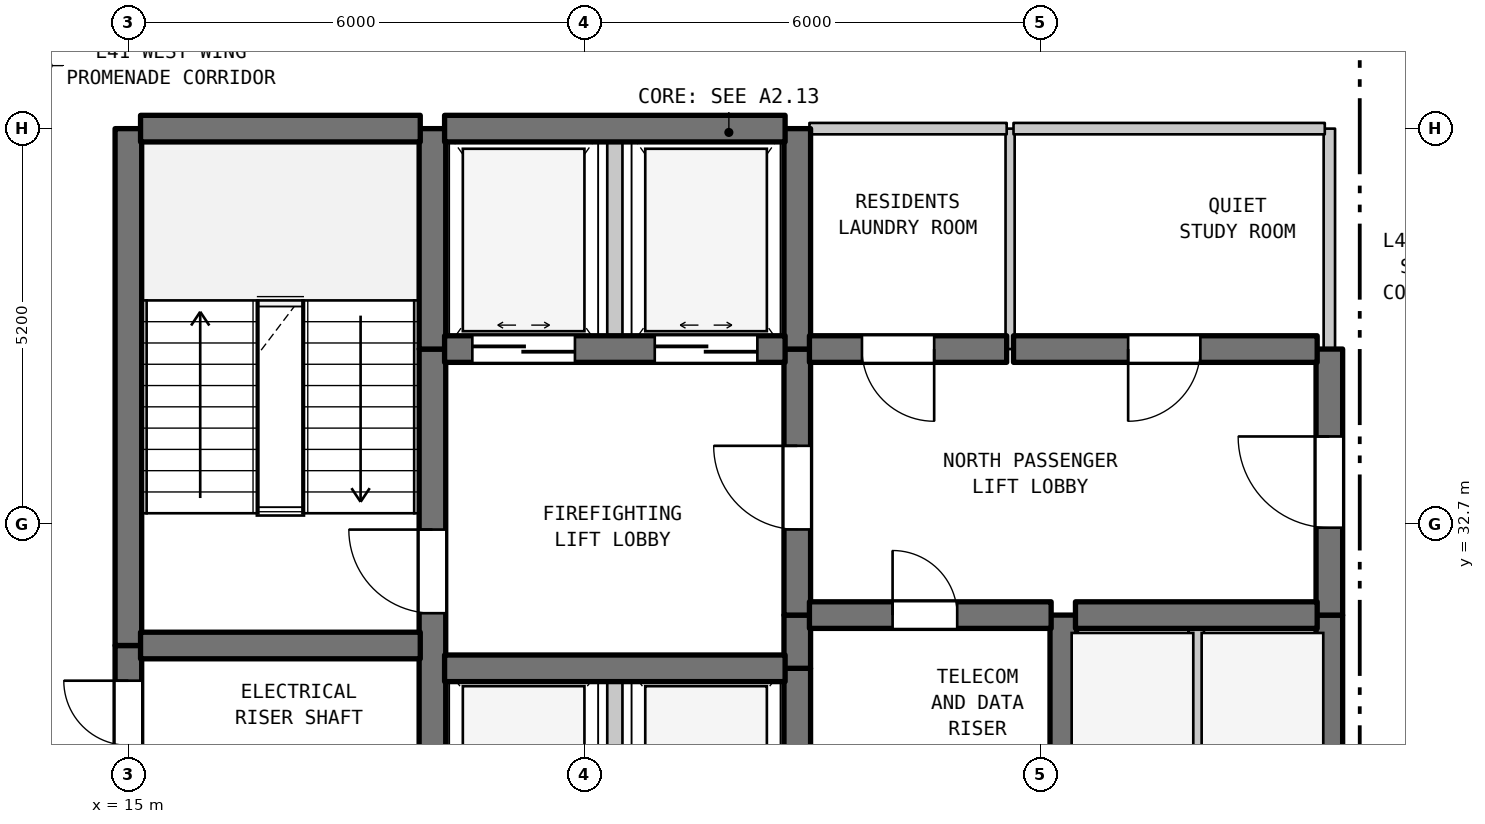
"""IFC4 building model, lengths in metres.
Left out: names, types, materials, properties, quantities, classifications, styles, units other than length and angle.
Written with IfcOpenShell. Run it as: python <this file> out.ifc"""

import sys

from ifc_helpers import new_model, si_unit, direction, frame, frame_2d, origin, place, context, subcontext, project, spatial, rectangle, extrude, element, fill, save


model = new_model("IFC4")
c1 = context("Model", 3, precision=1e-05, world=origin(), true_north=direction((0.0, 1.0)))
c2 = subcontext(c1, "Body", "Model", "MODEL_VIEW")
j1 = project(units=[si_unit("LENGTHUNIT", "METRE"), si_unit("PLANEANGLEUNIT", "RADIAN")], contexts=[c1])
p1 = place(None, origin())
s1 = spatial("IfcSite", under=j1, at=p1, CompositionType="ELEMENT")
p2 = place(p1, origin())
s2 = spatial("IfcBuilding", under=s1, at=p2, CompositionType="ELEMENT")
p3 = place(p2, frame((0.0, 0.0, 169.1)))
s3 = spatial("IfcBuildingStorey", under=s2, at=p3, CompositionType="ELEMENT", Elevation=169.1)
p4 = place(p3, frame((15.0, 29.5, 0.0), z_axis=(0.0, 0.0, 1.0), x_axis=(0.0, 1.0, 0.0)))
e1 = element("IfcWall", 1, at=p4, inside=s3, PredefinedType="SHEAR", context=c2, shape_type="SweptSolid", body=[
    extrude(rectangle(XDim=1.6, YDim=0.35, at=frame_2d((0.8, 0.0))), origin(), (0.0, 0.0, 1.0), 3.39),
])
p5 = place(p4, frame((0.287, 0.0, 0.0)))
e2 = element("IfcOpeningElement", 2, at=p5, cuts=e1, PredefinedType="OPENING", context=c2, shape_type="SweptSolid", body=[
    extrude(rectangle(XDim=0.85, YDim=2.1, at=frame_2d((0.425, 1.05))), frame((0.0, 0.185, 0.0), z_axis=(0.0, -1.0, 0.0), x_axis=(1.0, 0.0, 0.0)), (0.0, 0.0, 1.0), 0.37),
])
p6 = place(p3, frame((15.0, 31.1, 0.0), z_axis=(0.0, 0.0, 1.0), x_axis=(0.0, 1.0, 0.0)))
e3 = element("IfcWall", 3, at=p6, inside=s3, PredefinedType="SHEAR", context=c2, shape_type="SweptSolid", body=[
    extrude(rectangle(XDim=6.8, YDim=0.35, at=frame_2d((3.4, 0.0))), origin(), (0.0, 0.0, 1.0), 3.39),
])
p7 = place(p3, frame((19.0, 29.5, 0.0), z_axis=(0.0, 0.0, 1.0), x_axis=(0.0, 1.0, 0.0)))
e4 = element("IfcWall", 4, at=p7, inside=s3, PredefinedType="SHEAR", context=c2, shape_type="SweptSolid", body=[
    extrude(rectangle(XDim=5.5, YDim=0.35, at=frame_2d((2.75, 0.0))), origin(), (0.0, 0.0, 1.0), 3.39),
])
p8 = place(p7, frame((2.025, 0.0, 0.0)))
e5 = element("IfcOpeningElement", 5, at=p8, cuts=e4, PredefinedType="OPENING", context=c2, shape_type="SweptSolid", body=[
    extrude(rectangle(XDim=1.1, YDim=2.15, at=frame_2d((0.55, 1.075))), frame((0.0, 0.185, 0.0), z_axis=(0.0, -1.0, 0.0), x_axis=(1.0, 0.0, 0.0)), (0.0, 0.0, 1.0), 0.37),
])
p9 = place(p3, frame((19.0, 35.0, 0.0), z_axis=(0.0, 0.0, 1.0), x_axis=(0.0, 1.0, 0.0)))
e6 = element("IfcWall", 6, at=p9, inside=s3, PredefinedType="SHEAR", context=c2, shape_type="SweptSolid", body=[
    extrude(rectangle(XDim=2.9, YDim=0.35, at=frame_2d((1.45, 0.0))), origin(), (0.0, 0.0, 1.0), 3.39),
])
p10 = place(p3, frame((21.4, 28.2, 0.0), z_axis=(0.0, 0.0, 1.0), x_axis=(0.0, 1.0, 0.0)))
e7 = element("IfcWall", 7, at=p10, inside=s3, PredefinedType="STANDARD", context=c2, shape_type="SweptSolid", body=[
    extrude(rectangle(XDim=2.6, YDim=0.2, at=frame_2d((1.3, 0.0))), origin(), (0.0, 0.0, 1.0), 3.39),
])
p11 = place(p3, frame((21.4, 35.0, 0.0), z_axis=(0.0, 0.0, 1.0), x_axis=(0.0, 1.0, 0.0)))
e8 = element("IfcWall", 8, at=p11, inside=s3, PredefinedType="STANDARD", context=c2, shape_type="SweptSolid", body=[
    extrude(rectangle(XDim=2.9, YDim=0.2, at=frame_2d((1.45, 0.0))), origin(), (0.0, 0.0, 1.0), 3.39),
])
p12 = place(p3, frame((23.8, 29.5, 0.0), z_axis=(0.0, 0.0, 1.0), x_axis=(0.0, 1.0, 0.0)))
e9 = element("IfcWall", 9, at=p12, inside=s3, PredefinedType="SHEAR", context=c2, shape_type="SweptSolid", body=[
    extrude(rectangle(XDim=1.3, YDim=0.35, at=frame_2d((0.65, 0.0))), origin(), (0.0, 0.0, 1.0), 3.39),
])
p13 = place(p3, frame((23.8, 30.8, 0.0), z_axis=(0.0, 0.0, 1.0), x_axis=(0.0, 1.0, 0.0)))
e10 = element("IfcWall", 10, at=p13, inside=s3, PredefinedType="SHEAR", context=c2, shape_type="SweptSolid", body=[
    extrude(rectangle(XDim=0.7, YDim=0.35, at=frame_2d((0.35, 0.0))), origin(), (0.0, 0.0, 1.0), 3.39),
])
p14 = place(p3, frame((23.8, 31.5, 0.0), z_axis=(0.0, 0.0, 1.0), x_axis=(0.0, 1.0, 0.0)))
e11 = element("IfcWall", 11, at=p14, inside=s3, PredefinedType="SHEAR", context=c2, shape_type="SweptSolid", body=[
    extrude(rectangle(XDim=3.5, YDim=0.35, at=frame_2d((1.75, 0.0))), origin(), (0.0, 0.0, 1.0), 3.39),
])
p15 = place(p14, frame((1.127, 0.0, 0.0)))
e12 = element("IfcOpeningElement", 12, at=p15, cuts=e11, PredefinedType="OPENING", context=c2, shape_type="SweptSolid", body=[
    extrude(rectangle(XDim=1.1, YDim=2.15, at=frame_2d((0.55, 1.075))), frame((0.0, 0.185, 0.0), z_axis=(0.0, -1.0, 0.0), x_axis=(1.0, 0.0, 0.0)), (0.0, 0.0, 1.0), 0.37),
])
p16 = place(p3, frame((23.8, 35.0, 0.0), z_axis=(0.0, 0.0, 1.0), x_axis=(0.0, 1.0, 0.0)))
e13 = element("IfcWall", 13, at=p16, inside=s3, PredefinedType="SHEAR", context=c2, shape_type="SweptSolid", body=[
    extrude(rectangle(XDim=2.9, YDim=0.35, at=frame_2d((1.45, 0.0))), origin(), (0.0, 0.0, 1.0), 3.39),
])
p17 = place(p3, frame((26.6, 35.0, 0.0), z_axis=(0.0, 0.0, 1.0), x_axis=(0.0, 1.0, 0.0)))
e14 = element("IfcWall", 14, at=p17, inside=s3, PredefinedType="PARTITIONING", context=c2, shape_type="SweptSolid", body=[
    extrude(rectangle(XDim=2.9, YDim=0.12, at=frame_2d((1.45, 0.0))), origin(), (0.0, 0.0, 1.0), 3.39),
])
p18 = place(p3, frame((27.3, 29.5, 0.0), z_axis=(0.0, 0.0, 1.0), x_axis=(0.0, 1.0, 0.0)))
e15 = element("IfcWall", 15, at=p18, inside=s3, PredefinedType="SHEAR", context=c2, shape_type="SweptSolid", body=[
    extrude(rectangle(XDim=2.0, YDim=0.35, at=frame_2d((1.0, 0.0))), origin(), (0.0, 0.0, 1.0), 3.39),
])
p19 = place(p3, frame((29.05, 28.9, 0.0), z_axis=(0.0, 0.0, 1.0), x_axis=(0.0, 1.0, 0.0)))
e16 = element("IfcWall", 16, at=p19, inside=s3, PredefinedType="STANDARD", context=c2, shape_type="SweptSolid", body=[
    extrude(rectangle(XDim=2.6, YDim=0.2, at=frame_2d((1.3, 0.0))), origin(), (0.0, 0.0, 1.0), 3.39),
])
p20 = place(p3, frame((30.8, 28.9, 0.0), z_axis=(0.0, 0.0, 1.0), x_axis=(0.0, 1.0, 0.0)))
e17 = element("IfcWall", 17, at=p20, inside=s3, PredefinedType="SHEAR", context=c2, shape_type="SweptSolid", body=[
    extrude(rectangle(XDim=2.6, YDim=0.35, at=frame_2d((1.3, 0.0))), origin(), (0.0, 0.0, 1.0), 3.39),
])
p21 = place(p3, frame((30.8, 31.5, 0.0), z_axis=(0.0, 0.0, 1.0), x_axis=(0.0, 1.0, 0.0)))
e18 = element("IfcWall", 18, at=p21, inside=s3, PredefinedType="SHEAR", context=c2, shape_type="SweptSolid", body=[
    extrude(rectangle(XDim=3.5, YDim=0.35, at=frame_2d((1.75, 0.0))), origin(), (0.0, 0.0, 1.0), 3.39),
])
p22 = place(p21, frame((1.15, 0.0, 0.0)))
e19 = element("IfcOpeningElement", 19, at=p22, cuts=e18, PredefinedType="OPENING", context=c2, shape_type="SweptSolid", body=[
    extrude(rectangle(XDim=1.2, YDim=2.2, at=frame_2d((0.6, 1.1))), frame((0.0, 0.185, 0.0), z_axis=(0.0, -1.0, 0.0), x_axis=(1.0, 0.0, 0.0)), (0.0, 0.0, 1.0), 0.37),
])
p23 = place(p3, frame((30.8, 35.0, 0.0), z_axis=(0.0, 0.0, 1.0), x_axis=(0.0, 1.0, 0.0)))
e20 = element("IfcWall", 20, at=p23, inside=s3, PredefinedType="STANDARD", context=c2, shape_type="SweptSolid", body=[
    extrude(rectangle(XDim=2.9, YDim=0.15, at=frame_2d((1.45, 0.0))), origin(), (0.0, 0.0, 1.0), 3.39),
])
p24 = place(p3, frame((19.16, 30.8, 0.0), z_axis=(0.0, 0.0, 1.0), x_axis=(1.0, 0.0, 0.0)))
e21 = element("IfcWall", 21, at=p24, inside=s3, PredefinedType="SHEAR", context=c2, shape_type="SweptSolid", body=[
    extrude(rectangle(XDim=4.48, YDim=0.35, at=frame_2d((2.24, 0.0))), origin(), (0.0, 0.0, 1.0), 3.39),
])
p25 = place(p3, frame((15.16, 31.1, 0.0), z_axis=(0.0, 0.0, 1.0), x_axis=(1.0, 0.0, 0.0)))
e22 = element("IfcWall", 22, at=p25, inside=s3, PredefinedType="SHEAR", context=c2, shape_type="SweptSolid", body=[
    extrude(rectangle(XDim=3.68, YDim=0.35, at=frame_2d((1.84, 0.0))), origin(), (0.0, 0.0, 1.0), 3.39),
])
p26 = place(p3, frame((23.96, 31.5, 0.0), z_axis=(0.0, 0.0, 1.0), x_axis=(1.0, 0.0, 0.0)))
e23 = element("IfcWall", 23, at=p26, inside=s3, PredefinedType="SHEAR", context=c2, shape_type="SweptSolid", body=[
    extrude(rectangle(XDim=3.18, YDim=0.35, at=frame_2d((1.59, 0.0))), origin(), (0.0, 0.0, 1.0), 3.39),
])
p27 = place(p26, frame((1.094, 0.0, 0.0)))
e24 = element("IfcOpeningElement", 24, at=p27, cuts=e23, PredefinedType="OPENING", context=c2, shape_type="SweptSolid", body=[
    extrude(rectangle(XDim=0.85, YDim=2.1, at=frame_2d((0.425, 1.05))), frame((0.0, 0.185, 0.0), z_axis=(0.0, -1.0, 0.0), x_axis=(1.0, 0.0, 0.0)), (0.0, 0.0, 1.0), 0.37),
])
p28 = place(p3, frame((27.46, 31.5, 0.0), z_axis=(0.0, 0.0, 1.0), x_axis=(1.0, 0.0, 0.0)))
e25 = element("IfcWall", 25, at=p28, inside=s3, PredefinedType="SHEAR", context=c2, shape_type="SweptSolid", body=[
    extrude(rectangle(XDim=3.18, YDim=0.35, at=frame_2d((1.59, 0.0))), origin(), (0.0, 0.0, 1.0), 3.39),
])
p29 = place(p3, frame((19.16, 35.0, 0.0), z_axis=(0.0, 0.0, 1.0), x_axis=(1.0, 0.0, 0.0)))
e26 = element("IfcWall", 26, at=p29, inside=s3, PredefinedType="SHEAR", context=c2, shape_type="SweptSolid", body=[
    extrude(rectangle(XDim=4.48, YDim=0.35, at=frame_2d((2.24, 0.0))), origin(), (0.0, 0.0, 1.0), 3.39),
])
p30 = place(p29, frame((0.365, 0.0, 0.0)))
e27 = element("IfcOpeningElement", 27, at=p30, cuts=e26, PredefinedType="OPENING", context=c2, shape_type="SweptSolid", body=[
    extrude(rectangle(XDim=1.35, YDim=2.2, at=frame_2d((0.675, 1.1))), frame((0.0, 0.185, 0.0), z_axis=(0.0, -1.0, 0.0), x_axis=(1.0, 0.0, 0.0)), (0.0, 0.0, 1.0), 0.37),
])
p31 = place(p29, frame((2.765, 0.0, 0.0)))
e28 = element("IfcOpeningElement", 28, at=p31, cuts=e26, PredefinedType="OPENING", context=c2, shape_type="SweptSolid", body=[
    extrude(rectangle(XDim=1.35, YDim=2.2, at=frame_2d((0.675, 1.1))), frame((0.0, 0.185, 0.0), z_axis=(0.0, -1.0, 0.0), x_axis=(1.0, 0.0, 0.0)), (0.0, 0.0, 1.0), 0.37),
])
p32 = place(p3, frame((23.96, 35.0, 0.0), z_axis=(0.0, 0.0, 1.0), x_axis=(1.0, 0.0, 0.0)))
e29 = element("IfcWall", 29, at=p32, inside=s3, PredefinedType="SHEAR", context=c2, shape_type="SweptSolid", body=[
    extrude(rectangle(XDim=2.595, YDim=0.35, at=frame_2d((1.297, 0.0))), origin(), (0.0, 0.0, 1.0), 3.39),
])
p33 = place(p32, frame((0.691, 0.0, 0.0)))
e30 = element("IfcOpeningElement", 30, at=p33, cuts=e29, PredefinedType="OPENING", context=c2, shape_type="SweptSolid", body=[
    extrude(rectangle(XDim=0.95, YDim=2.15, at=frame_2d((0.475, 1.075))), frame((0.0, 0.185, 0.0), z_axis=(0.0, -1.0, 0.0), x_axis=(1.0, 0.0, 0.0)), (0.0, 0.0, 1.0), 0.37),
])
p34 = place(p3, frame((26.645, 35.0, 0.0), z_axis=(0.0, 0.0, 1.0), x_axis=(1.0, 0.0, 0.0)))
e31 = element("IfcWall", 31, at=p34, inside=s3, PredefinedType="SHEAR", context=c2, shape_type="SweptSolid", body=[
    extrude(rectangle(XDim=3.995, YDim=0.35, at=frame_2d((1.998, 0.0))), origin(), (0.0, 0.0, 1.0), 3.39),
])
p35 = place(p34, frame((1.508, 0.0, 0.0)))
e32 = element("IfcOpeningElement", 32, at=p35, cuts=e31, PredefinedType="OPENING", context=c2, shape_type="SweptSolid", body=[
    extrude(rectangle(XDim=0.95, YDim=2.15, at=frame_2d((0.475, 1.075))), frame((0.0, 0.185, 0.0), z_axis=(0.0, -1.0, 0.0), x_axis=(1.0, 0.0, 0.0)), (0.0, 0.0, 1.0), 0.37),
])
p36 = place(p3, frame((15.16, 37.9, 0.0), z_axis=(0.0, 0.0, 1.0), x_axis=(1.0, 0.0, 0.0)))
e33 = element("IfcWall", 33, at=p36, inside=s3, PredefinedType="SHEAR", context=c2, shape_type="SweptSolid", body=[
    extrude(rectangle(XDim=3.68, YDim=0.35, at=frame_2d((1.84, 0.0))), origin(), (0.0, 0.0, 1.0), 3.39),
])
p37 = place(p3, frame((19.16, 37.9, 0.0), z_axis=(0.0, 0.0, 1.0), x_axis=(1.0, 0.0, 0.0)))
e34 = element("IfcWall", 34, at=p37, inside=s3, PredefinedType="SHEAR", context=c2, shape_type="SweptSolid", body=[
    extrude(rectangle(XDim=4.48, YDim=0.35, at=frame_2d((2.24, 0.0))), origin(), (0.0, 0.0, 1.0), 3.39),
])
p38 = place(p3, frame((23.96, 37.9, 0.0), z_axis=(0.0, 0.0, 1.0), x_axis=(1.0, 0.0, 0.0)))
e35 = element("IfcWall", 35, at=p38, inside=s3, PredefinedType="STANDARD", context=c2, shape_type="SweptSolid", body=[
    extrude(rectangle(XDim=2.595, YDim=0.15, at=frame_2d((1.297, 0.0))), origin(), (0.0, 0.0, 1.0), 2.89),
])
p39 = place(p3, frame((26.645, 37.9, 0.0), z_axis=(0.0, 0.0, 1.0), x_axis=(1.0, 0.0, 0.0)))
e36 = element("IfcWall", 36, at=p39, inside=s3, PredefinedType="STANDARD", context=c2, shape_type="SweptSolid", body=[
    extrude(rectangle(XDim=4.095, YDim=0.15, at=frame_2d((2.047, 0.0))), origin(), (0.0, 0.0, 1.0), 2.89),
])
p40 = place(p5, origin())
e37 = element("IfcDoor", 37, at=p40, inside=s3, OperationType="SINGLE_SWING_RIGHT", PredefinedType="DOOR", context=c2, shape_type="SweptSolid", body=[
    extrude(rectangle(XDim=0.85, YDim=2.1, at=frame_2d((0.425, 1.05))), frame((0.0, 0.025, 0.0), z_axis=(0.0, -1.0, 0.0), x_axis=(1.0, 0.0, 0.0)), (0.0, 0.0, 1.0), 0.05),
])
fill(e2, e37)
p41 = place(p8, origin())
e38 = element("IfcDoor", 38, at=p41, inside=s3, OperationType="SINGLE_SWING_RIGHT", PredefinedType="DOOR", context=c2, shape_type="SweptSolid", body=[
    extrude(rectangle(XDim=1.1, YDim=2.15, at=frame_2d((0.55, 1.075))), frame((0.0, 0.025, 0.0), z_axis=(0.0, -1.0, 0.0), x_axis=(1.0, 0.0, 0.0)), (0.0, 0.0, 1.0), 0.05),
])
fill(e5, e38)
p42 = place(p15, origin())
e39 = element("IfcDoor", 39, at=p42, inside=s3, OperationType="SINGLE_SWING_RIGHT", PredefinedType="DOOR", context=c2, shape_type="SweptSolid", body=[
    extrude(rectangle(XDim=1.1, YDim=2.15, at=frame_2d((0.55, 1.075))), frame((0.0, 0.025, 0.0), z_axis=(0.0, -1.0, 0.0), x_axis=(1.0, 0.0, 0.0)), (0.0, 0.0, 1.0), 0.05),
])
fill(e12, e39)
p43 = place(p22, origin())
e40 = element("IfcDoor", 40, at=p43, inside=s3, OperationType="SINGLE_SWING_RIGHT", PredefinedType="DOOR", context=c2, shape_type="SweptSolid", body=[
    extrude(rectangle(XDim=1.2, YDim=2.2, at=frame_2d((0.6, 1.1))), frame((0.0, 0.025, 0.0), z_axis=(0.0, -1.0, 0.0), x_axis=(1.0, 0.0, 0.0)), (0.0, 0.0, 1.0), 0.05),
])
fill(e19, e40)
p44 = place(p27, origin())
e41 = element("IfcDoor", 41, at=p44, inside=s3, OperationType="SINGLE_SWING_LEFT", PredefinedType="DOOR", context=c2, shape_type="SweptSolid", body=[
    extrude(rectangle(XDim=0.85, YDim=2.1, at=frame_2d((0.425, 1.05))), frame((0.0, 0.025, 0.0), z_axis=(0.0, -1.0, 0.0), x_axis=(1.0, 0.0, 0.0)), (0.0, 0.0, 1.0), 0.05),
])
fill(e24, e41)
p45 = place(p30, origin())
e42 = element("IfcDoor", 42, at=p45, inside=s3, OperationType="DOUBLE_DOOR_SLIDING", PredefinedType="DOOR", context=c2, shape_type="SweptSolid", body=[
    extrude(rectangle(XDim=1.35, YDim=2.2, at=frame_2d((0.675, 1.1))), frame((0.0, 0.025, 0.0), z_axis=(0.0, -1.0, 0.0), x_axis=(1.0, 0.0, 0.0)), (0.0, 0.0, 1.0), 0.05),
])
fill(e27, e42)
p46 = place(p31, origin())
e43 = element("IfcDoor", 43, at=p46, inside=s3, OperationType="DOUBLE_DOOR_SLIDING", PredefinedType="DOOR", context=c2, shape_type="SweptSolid", body=[
    extrude(rectangle(XDim=1.35, YDim=2.2, at=frame_2d((0.675, 1.1))), frame((0.0, 0.025, 0.0), z_axis=(0.0, -1.0, 0.0), x_axis=(1.0, 0.0, 0.0)), (0.0, 0.0, 1.0), 0.05),
])
fill(e28, e43)
p47 = place(p33, frame((0.95, 0.0, 0.0), z_axis=(0.0, 0.0, 1.0), x_axis=(-1.0, 0.0, 0.0)))
e44 = element("IfcDoor", 44, at=p47, inside=s3, OperationType="SINGLE_SWING_RIGHT", PredefinedType="DOOR", context=c2, shape_type="SweptSolid", body=[
    extrude(rectangle(XDim=0.95, YDim=2.15, at=frame_2d((0.475, 1.075))), frame((0.0, 0.025, 0.0), z_axis=(0.0, -1.0, 0.0), x_axis=(1.0, 0.0, 0.0)), (0.0, 0.0, 1.0), 0.05),
])
fill(e30, e44)
p48 = place(p35, frame((0.95, 0.0, 0.0), z_axis=(0.0, 0.0, 1.0), x_axis=(-1.0, 0.0, 0.0)))
e45 = element("IfcDoor", 45, at=p48, inside=s3, OperationType="SINGLE_SWING_LEFT", PredefinedType="DOOR", context=c2, shape_type="SweptSolid", body=[
    extrude(rectangle(XDim=0.95, YDim=2.15, at=frame_2d((0.475, 1.075))), frame((0.0, 0.025, 0.0), z_axis=(0.0, -1.0, 0.0), x_axis=(1.0, 0.0, 0.0)), (0.0, 0.0, 1.0), 0.05),
])
fill(e32, e45)
save(model, sys.argv[1])
